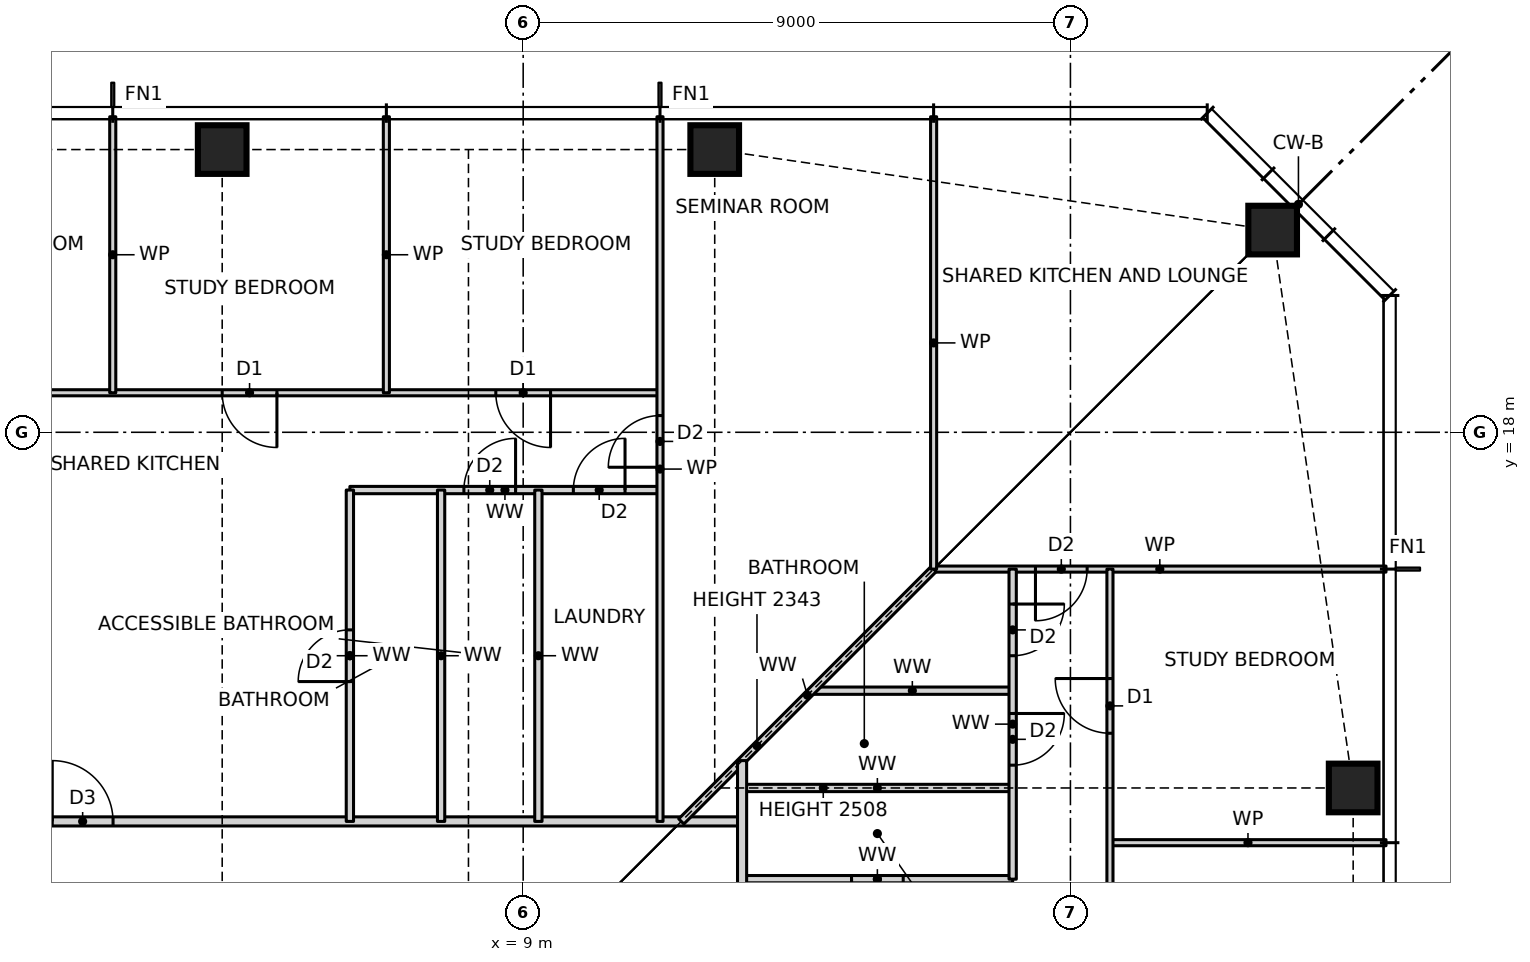
"""IFC4 building model, lengths in metres.
Left out: names, types, materials, properties, quantities, classifications, styles, units other than length and angle.
Written with IfcOpenShell. Run it as: python <this file> out.ifc"""

import sys

from ifc_helpers import new_model, si_unit, direction, frame, frame_2d, origin, origin_2d, place, context, subcontext, project, spatial, rectangle, hollow_rectangle, extrude, element, fill, save


model = new_model("IFC4")
c1 = context("Model", 3, precision=1e-05, world=origin(), true_north=direction((0.0, 1.0)))
c2 = subcontext(c1, "Body", "Model", "MODEL_VIEW")
j1 = project(units=[si_unit("LENGTHUNIT", "METRE"), si_unit("PLANEANGLEUNIT", "RADIAN")], contexts=[c1])
p1 = place(None, origin())
s1 = spatial("IfcSite", under=j1, at=p1, CompositionType="ELEMENT")
p2 = place(p1, origin())
s2 = spatial("IfcBuilding", under=s1, at=p2, CompositionType="ELEMENT")
p3 = place(p2, frame((0.0, 0.0, 32.5)))
s3 = spatial("IfcBuildingStorey", under=s2, at=p3, CompositionType="ELEMENT", Elevation=32.5)
for number, where, z_axis, x_axis in (
    (1, (22.65, 12.15, 0.0), (0.0, 0.0, 1.0), (1.0, 0.0, 0.0)),
    (2, (21.326, 21.326, 0.0), (0.0, 0.0, 1.0), (1.0, 0.0, 0.0)),
    (3, (12.15, 22.65, 0.0), (0.0, 0.0, 1.0), (1.0, 0.0, 0.0)),
    (4, (4.05, 22.65, 0.0), (0.0, 0.0, 1.0), (1.0, 0.0, 0.0)),
):
    element("IfcColumn", number, at=place(p3, frame(where, z_axis=z_axis, x_axis=x_axis)), inside=s3, PredefinedType="COLUMN", context=c2, shape_type="SweptSolid", body=[
        extrude(hollow_rectangle(XDim=0.8, YDim=0.8, WallThickness=0.09, at=origin_2d()), origin(), (0.0, 0.0, 1.0), 3.5),
    ])
p4 = place(p3, frame((12.6, 10.65, 0.0), z_axis=(0.0, 0.0, 1.0), x_axis=(1.0, 0.0, 0.0)))
e5 = element("IfcWall", 5, at=p4, inside=s3, PredefinedType="PARTITIONING", context=c2, shape_type="SweptSolid", body=[
    extrude(rectangle(XDim=4.45, YDim=0.12, at=frame_2d((2.225, 0.0))), origin(), (0.0, 0.0, 1.0), 3.27),
])
p5 = place(p4, frame((1.8, 0.0, 0.0)))
e6 = element("IfcOpeningElement", 6, at=p5, cuts=e5, PredefinedType="OPENING", context=c2, shape_type="SweptSolid", body=[
    extrude(rectangle(XDim=0.85, YDim=2.1, at=frame_2d((0.425, 1.05))), frame((0.0, 0.07, 0.0), z_axis=(0.0, -1.0, 0.0), x_axis=(1.0, 0.0, 0.0)), (0.0, 0.0, 1.0), 0.14),
])
p6 = place(p3, frame((18.65, 11.25, 0.0), z_axis=(0.0, 0.0, 1.0), x_axis=(1.0, 0.0, 0.0)))
e7 = element("IfcWall", 7, at=p6, inside=s3, PredefinedType="PARTITIONING", context=c2, shape_type="SweptSolid", body=[
    extrude(rectangle(XDim=4.54, YDim=0.1, at=frame_2d((2.27, 0.0))), origin(), (0.0, 0.0, 1.0), 3.27),
])
p7 = place(p3, frame((-11.6, 11.6, 0.0), z_axis=(0.0, 0.0, 1.0), x_axis=(1.0, 0.0, 0.0)))
e8 = element("IfcWall", 8, at=p7, inside=s3, PredefinedType="PARTITIONING", context=c2, shape_type="SweptSolid", body=[
    extrude(rectangle(XDim=24.2, YDim=0.15, at=frame_2d((12.1, 0.0))), origin(), (0.0, 0.0, 1.0), 3.27),
])
p8 = place(p7, frame((12.855, 0.0, 0.0)))
e9 = element("IfcOpeningElement", 9, at=p8, cuts=e8, PredefinedType="OPENING", context=c2, shape_type="SweptSolid", body=[
    extrude(rectangle(XDim=1.0, YDim=2.1, at=frame_2d((0.5, 1.05))), frame((0.0, 0.085, 0.0), z_axis=(0.0, -1.0, 0.0), x_axis=(1.0, 0.0, 0.0)), (0.0, 0.0, 1.0), 0.17),
])
p9 = place(p3, frame((12.6, 12.15, 0.0), z_axis=(0.0, 0.0, 1.0), x_axis=(1.0, 0.0, 0.0)))
e10 = element("IfcWall", 10, at=p9, inside=s3, PredefinedType="PARTITIONING", context=c2, shape_type="SweptSolid", body=[
    extrude(rectangle(XDim=4.45, YDim=0.12, at=frame_2d((2.225, 0.0))), origin(), (0.0, 0.0, 1.0), 2.508),
])
p10 = place(p3, frame((13.75, 13.75, 0.0), z_axis=(0.0, 0.0, 1.0), x_axis=(1.0, 0.0, 0.0)))
e11 = element("IfcWall", 11, at=p10, inside=s3, PredefinedType="PARTITIONING", context=c2, shape_type="SweptSolid", body=[
    extrude(rectangle(XDim=3.3, YDim=0.12, at=frame_2d((1.65, 0.0))), origin(), (0.0, 0.0, 1.0), 3.27),
])
p11 = place(p3, frame((15.75, 15.75, 0.0), z_axis=(0.0, 0.0, 1.0), x_axis=(1.0, 0.0, 0.0)))
e12 = element("IfcWall", 12, at=p11, inside=s3, PredefinedType="PARTITIONING", context=c2, shape_type="SweptSolid", body=[
    extrude(rectangle(XDim=7.44, YDim=0.1, at=frame_2d((3.72, 0.0))), origin(), (0.0, 0.0, 1.0), 3.27),
])
p12 = place(p11, frame((1.675, 0.0, 0.0)))
e13 = element("IfcOpeningElement", 13, at=p12, cuts=e12, PredefinedType="OPENING", context=c2, shape_type="SweptSolid", body=[
    extrude(rectangle(XDim=0.85, YDim=2.1, at=frame_2d((0.425, 1.05))), frame((0.0, 0.06, 0.0), z_axis=(0.0, -1.0, 0.0), x_axis=(1.0, 0.0, 0.0)), (0.0, 0.0, 1.0), 0.12),
])
p13 = place(p3, frame((6.15, 17.05, 0.0), z_axis=(0.0, 0.0, 1.0), x_axis=(1.0, 0.0, 0.0)))
e14 = element("IfcWall", 14, at=p13, inside=s3, PredefinedType="PARTITIONING", context=c2, shape_type="SweptSolid", body=[
    extrude(rectangle(XDim=5.1, YDim=0.12, at=frame_2d((2.55, 0.0))), origin(), (0.0, 0.0, 1.0), 3.27),
])
p14 = place(p13, frame((3.675, 0.0, 0.0)))
e15 = element("IfcOpeningElement", 15, at=p14, cuts=e14, PredefinedType="OPENING", context=c2, shape_type="SweptSolid", body=[
    extrude(rectangle(XDim=0.85, YDim=2.1, at=frame_2d((0.425, 1.05))), frame((0.0, 0.07, 0.0), z_axis=(0.0, -1.0, 0.0), x_axis=(1.0, 0.0, 0.0)), (0.0, 0.0, 1.0), 0.14),
])
p15 = place(p13, frame((1.875, 0.0, 0.0)))
e16 = element("IfcOpeningElement", 16, at=p15, cuts=e14, PredefinedType="OPENING", context=c2, shape_type="SweptSolid", body=[
    extrude(rectangle(XDim=0.85, YDim=2.1, at=frame_2d((0.425, 1.05))), frame((0.0, 0.07, 0.0), z_axis=(0.0, -1.0, 0.0), x_axis=(1.0, 0.0, 0.0)), (0.0, 0.0, 1.0), 0.14),
])
p16 = place(p3, frame((-15.75, 18.65, 0.0), z_axis=(0.0, 0.0, 1.0), x_axis=(1.0, 0.0, 0.0)))
e17 = element("IfcWall", 17, at=p16, inside=s3, PredefinedType="PARTITIONING", context=c2, shape_type="SweptSolid", body=[
    extrude(rectangle(XDim=27.0, YDim=0.1, at=frame_2d((13.5, 0.0))), origin(), (0.0, 0.0, 1.0), 3.27),
])
p17 = place(p16, frame((24.3, 0.0, 0.0)))
e18 = element("IfcOpeningElement", 18, at=p17, cuts=e17, PredefinedType="OPENING", context=c2, shape_type="SweptSolid", body=[
    extrude(rectangle(XDim=0.9, YDim=2.1, at=frame_2d((0.45, 1.05))), frame((0.0, 0.06, 0.0), z_axis=(0.0, -1.0, 0.0), x_axis=(1.0, 0.0, 0.0)), (0.0, 0.0, 1.0), 0.12),
])
p18 = place(p16, frame((19.8, 0.0, 0.0)))
e19 = element("IfcOpeningElement", 19, at=p18, cuts=e17, PredefinedType="OPENING", context=c2, shape_type="SweptSolid", body=[
    extrude(rectangle(XDim=0.9, YDim=2.1, at=frame_2d((0.45, 1.05))), frame((0.0, 0.06, 0.0), z_axis=(0.0, -1.0, 0.0), x_axis=(1.0, 0.0, 0.0)), (0.0, 0.0, 1.0), 0.12),
])
p19 = place(p16, frame((15.3, 0.0, 0.0)))
e20 = element("IfcOpeningElement", 20, at=p19, cuts=e17, PredefinedType="OPENING", context=c2, shape_type="SweptSolid", body=[
    extrude(rectangle(XDim=0.9, YDim=2.1, at=frame_2d((0.45, 1.05))), frame((0.0, 0.06, 0.0), z_axis=(0.0, -1.0, 0.0), x_axis=(1.0, 0.0, 0.0)), (0.0, 0.0, 1.0), 0.12),
])
p20 = place(p16, frame((10.8, 0.0, 0.0)))
e21 = element("IfcOpeningElement", 21, at=p20, cuts=e17, PredefinedType="OPENING", context=c2, shape_type="SweptSolid", body=[
    extrude(rectangle(XDim=0.9, YDim=2.1, at=frame_2d((0.45, 1.05))), frame((0.0, 0.06, 0.0), z_axis=(0.0, -1.0, 0.0), x_axis=(1.0, 0.0, 0.0)), (0.0, 0.0, 1.0), 0.12),
])
p21 = place(p16, frame((6.3, 0.0, 0.0)))
e22 = element("IfcOpeningElement", 22, at=p21, cuts=e17, PredefinedType="OPENING", context=c2, shape_type="SweptSolid", body=[
    extrude(rectangle(XDim=0.9, YDim=2.1, at=frame_2d((0.45, 1.05))), frame((0.0, 0.06, 0.0), z_axis=(0.0, -1.0, 0.0), x_axis=(1.0, 0.0, 0.0)), (0.0, 0.0, 1.0), 0.12),
])
p22 = place(p16, frame((1.8, 0.0, 0.0)))
e23 = element("IfcOpeningElement", 23, at=p22, cuts=e17, PredefinedType="OPENING", context=c2, shape_type="SweptSolid", body=[
    extrude(rectangle(XDim=0.9, YDim=2.1, at=frame_2d((0.45, 1.05))), frame((0.0, 0.06, 0.0), z_axis=(0.0, -1.0, 0.0), x_axis=(1.0, 0.0, 0.0)), (0.0, 0.0, 1.0), 0.12),
])
p23 = place(p3, frame((11.6, 11.6, 0.0), z_axis=(0.0, 0.0, 1.0), x_axis=(0.707106781187, 0.707106781187, 0.0)))
e24 = element("IfcWall", 24, at=p23, inside=s3, PredefinedType="PARTITIONING", context=c2, shape_type="SweptSolid", body=[
    extrude(rectangle(XDim=5.869, YDim=0.12, at=frame_2d((2.935, 0.0))), origin(), (0.0, 0.0, 1.0), 2.343),
])
p24 = place(p3, frame((18.65, -15.75, 0.0), z_axis=(0.0, 0.0, 1.0), x_axis=(0.0, 1.0, 0.0)))
e25 = element("IfcWall", 25, at=p24, inside=s3, PredefinedType="PARTITIONING", context=c2, shape_type="SweptSolid", body=[
    extrude(rectangle(XDim=31.5, YDim=0.1, at=frame_2d((15.75, 0.0))), origin(), (0.0, 0.0, 1.0), 3.27),
])
p25 = place(p24, frame((1.8, 0.0, 0.0)))
e26 = element("IfcOpeningElement", 26, at=p25, cuts=e25, PredefinedType="OPENING", context=c2, shape_type="SweptSolid", body=[
    extrude(rectangle(XDim=0.9, YDim=2.1, at=frame_2d((0.45, 1.05))), frame((0.0, 0.06, 0.0), z_axis=(0.0, -1.0, 0.0), x_axis=(1.0, 0.0, 0.0)), (0.0, 0.0, 1.0), 0.12),
])
p26 = place(p24, frame((6.3, 0.0, 0.0)))
e27 = element("IfcOpeningElement", 27, at=p26, cuts=e25, PredefinedType="OPENING", context=c2, shape_type="SweptSolid", body=[
    extrude(rectangle(XDim=0.9, YDim=2.1, at=frame_2d((0.45, 1.05))), frame((0.0, 0.06, 0.0), z_axis=(0.0, -1.0, 0.0), x_axis=(1.0, 0.0, 0.0)), (0.0, 0.0, 1.0), 0.12),
])
p27 = place(p24, frame((10.8, 0.0, 0.0)))
e28 = element("IfcOpeningElement", 28, at=p27, cuts=e25, PredefinedType="OPENING", context=c2, shape_type="SweptSolid", body=[
    extrude(rectangle(XDim=0.9, YDim=2.1, at=frame_2d((0.45, 1.05))), frame((0.0, 0.06, 0.0), z_axis=(0.0, -1.0, 0.0), x_axis=(1.0, 0.0, 0.0)), (0.0, 0.0, 1.0), 0.12),
])
p28 = place(p24, frame((15.3, 0.0, 0.0)))
e29 = element("IfcOpeningElement", 29, at=p28, cuts=e25, PredefinedType="OPENING", context=c2, shape_type="SweptSolid", body=[
    extrude(rectangle(XDim=0.9, YDim=2.1, at=frame_2d((0.45, 1.05))), frame((0.0, 0.06, 0.0), z_axis=(0.0, -1.0, 0.0), x_axis=(1.0, 0.0, 0.0)), (0.0, 0.0, 1.0), 0.12),
])
p29 = place(p24, frame((19.8, 0.0, 0.0)))
e30 = element("IfcOpeningElement", 30, at=p29, cuts=e25, PredefinedType="OPENING", context=c2, shape_type="SweptSolid", body=[
    extrude(rectangle(XDim=0.9, YDim=2.1, at=frame_2d((0.45, 1.05))), frame((0.0, 0.06, 0.0), z_axis=(0.0, -1.0, 0.0), x_axis=(1.0, 0.0, 0.0)), (0.0, 0.0, 1.0), 0.12),
])
p30 = place(p24, frame((24.3, 0.0, 0.0)))
e31 = element("IfcOpeningElement", 31, at=p30, cuts=e25, PredefinedType="OPENING", context=c2, shape_type="SweptSolid", body=[
    extrude(rectangle(XDim=0.9, YDim=2.1, at=frame_2d((0.45, 1.05))), frame((0.0, 0.06, 0.0), z_axis=(0.0, -1.0, 0.0), x_axis=(1.0, 0.0, 0.0)), (0.0, 0.0, 1.0), 0.12),
])
p31 = place(p24, frame((28.8, 0.0, 0.0)))
e32 = element("IfcOpeningElement", 32, at=p31, cuts=e25, PredefinedType="OPENING", context=c2, shape_type="SweptSolid", body=[
    extrude(rectangle(XDim=0.9, YDim=2.1, at=frame_2d((0.45, 1.05))), frame((0.0, 0.06, 0.0), z_axis=(0.0, -1.0, 0.0), x_axis=(1.0, 0.0, 0.0)), (0.0, 0.0, 1.0), 0.12),
])
p32 = place(p3, frame((17.05, 10.65, 0.0), z_axis=(0.0, 0.0, 1.0), x_axis=(0.0, 1.0, 0.0)))
e33 = element("IfcWall", 33, at=p32, inside=s3, PredefinedType="PARTITIONING", context=c2, shape_type="SweptSolid", body=[
    extrude(rectangle(XDim=5.1, YDim=0.12, at=frame_2d((2.55, 0.0))), origin(), (0.0, 0.0, 1.0), 3.27),
])
p33 = place(p32, frame((1.875, 0.0, 0.0)))
e34 = element("IfcOpeningElement", 34, at=p33, cuts=e33, PredefinedType="OPENING", context=c2, shape_type="SweptSolid", body=[
    extrude(rectangle(XDim=0.85, YDim=2.1, at=frame_2d((0.425, 1.05))), frame((0.0, 0.07, 0.0), z_axis=(0.0, -1.0, 0.0), x_axis=(1.0, 0.0, 0.0)), (0.0, 0.0, 1.0), 0.14),
])
p34 = place(p32, frame((3.675, 0.0, 0.0)))
e35 = element("IfcOpeningElement", 35, at=p34, cuts=e33, PredefinedType="OPENING", context=c2, shape_type="SweptSolid", body=[
    extrude(rectangle(XDim=0.85, YDim=2.1, at=frame_2d((0.425, 1.05))), frame((0.0, 0.07, 0.0), z_axis=(0.0, -1.0, 0.0), x_axis=(1.0, 0.0, 0.0)), (0.0, 0.0, 1.0), 0.14),
])
p35 = place(p3, frame((15.75, 15.75, 0.0), z_axis=(0.0, 0.0, 1.0), x_axis=(0.0, 1.0, 0.0)))
e36 = element("IfcWall", 36, at=p35, inside=s3, PredefinedType="PARTITIONING", context=c2, shape_type="SweptSolid", body=[
    extrude(rectangle(XDim=7.44, YDim=0.1, at=frame_2d((3.72, 0.0))), origin(), (0.0, 0.0, 1.0), 3.27),
])
p36 = place(p3, frame((12.6, -12.6, 0.0), z_axis=(0.0, 0.0, 1.0), x_axis=(0.0, 1.0, 0.0)))
e37 = element("IfcWall", 37, at=p36, inside=s3, PredefinedType="PARTITIONING", context=c2, shape_type="SweptSolid", body=[
    extrude(rectangle(XDim=25.2, YDim=0.15, at=frame_2d((12.6, 0.0))), origin(), (0.0, 0.0, 1.0), 3.27),
])
p37 = place(p36, frame((21.55, 0.0, 0.0)))
e38 = element("IfcOpeningElement", 38, at=p37, cuts=e37, PredefinedType="OPENING", context=c2, shape_type="SweptSolid", body=[
    extrude(rectangle(XDim=1.0, YDim=2.1, at=frame_2d((0.5, 1.05))), frame((0.0, 0.085, 0.0), z_axis=(0.0, -1.0, 0.0), x_axis=(1.0, 0.0, 0.0)), (0.0, 0.0, 1.0), 0.17),
])
p38 = place(p3, frame((11.25, 11.6, 0.0), z_axis=(0.0, 0.0, 1.0), x_axis=(0.0, 1.0, 0.0)))
e39 = element("IfcWall", 39, at=p38, inside=s3, PredefinedType="PARTITIONING", context=c2, shape_type="SweptSolid", body=[
    extrude(rectangle(XDim=11.59, YDim=0.1, at=frame_2d((5.795, 0.0))), origin(), (0.0, 0.0, 1.0), 3.27),
])
p39 = place(p38, frame((5.825, 0.0, 0.0)))
e40 = element("IfcOpeningElement", 40, at=p39, cuts=e39, PredefinedType="OPENING", context=c2, shape_type="SweptSolid", body=[
    extrude(rectangle(XDim=0.85, YDim=2.1, at=frame_2d((0.425, 1.05))), frame((0.0, 0.06, 0.0), z_axis=(0.0, -1.0, 0.0), x_axis=(1.0, 0.0, 0.0)), (0.0, 0.0, 1.0), 0.12),
])
for number, where, z_axis, x_axis in (
    (41, (9.25, 11.6, 0.0), (0.0, 0.0, 1.0), (0.0, 1.0, 0.0)),
    (42, (7.65, 11.6, 0.0), (0.0, 0.0, 1.0), (0.0, 1.0, 0.0)),
):
    element("IfcWall", number, at=place(p3, frame(where, z_axis=z_axis, x_axis=x_axis)), inside=s3, PredefinedType="PARTITIONING", context=c2, shape_type="SweptSolid", body=[
        extrude(rectangle(XDim=5.45, YDim=0.12, at=frame_2d((2.725, 0.0))), origin(), (0.0, 0.0, 1.0), 3.27),
    ])
p40 = place(p3, frame((6.75, 18.65, 0.0), z_axis=(0.0, 0.0, 1.0), x_axis=(0.0, 1.0, 0.0)))
e43 = element("IfcWall", 43, at=p40, inside=s3, PredefinedType="PARTITIONING", context=c2, shape_type="SweptSolid", body=[
    extrude(rectangle(XDim=4.54, YDim=0.1, at=frame_2d((2.27, 0.0))), origin(), (0.0, 0.0, 1.0), 3.27),
])
p41 = place(p3, frame((6.15, 11.6, 0.0), z_axis=(0.0, 0.0, 1.0), x_axis=(0.0, 1.0, 0.0)))
e44 = element("IfcWall", 44, at=p41, inside=s3, PredefinedType="PARTITIONING", context=c2, shape_type="SweptSolid", body=[
    extrude(rectangle(XDim=5.45, YDim=0.12, at=frame_2d((2.725, 0.0))), origin(), (0.0, 0.0, 1.0), 3.27),
])
p42 = place(p41, frame((2.3, 0.0, 0.0)))
e45 = element("IfcOpeningElement", 45, at=p42, cuts=e44, PredefinedType="OPENING", context=c2, shape_type="SweptSolid", body=[
    extrude(rectangle(XDim=0.85, YDim=2.1, at=frame_2d((0.425, 1.05))), frame((0.0, 0.07, 0.0), z_axis=(0.0, -1.0, 0.0), x_axis=(1.0, 0.0, 0.0)), (0.0, 0.0, 1.0), 0.14),
])
p43 = place(p3, frame((2.25, 18.65, 0.0), z_axis=(0.0, 0.0, 1.0), x_axis=(0.0, 1.0, 0.0)))
e46 = element("IfcWall", 46, at=p43, inside=s3, PredefinedType="PARTITIONING", context=c2, shape_type="SweptSolid", body=[
    extrude(rectangle(XDim=4.54, YDim=0.1, at=frame_2d((2.27, 0.0))), origin(), (0.0, 0.0, 1.0), 3.27),
])
p44 = place(p31, origin())
e47 = element("IfcDoor", 47, at=p44, inside=s3, OperationType="SINGLE_SWING_RIGHT", PredefinedType="DOOR", context=c2, shape_type="SweptSolid", body=[
    extrude(rectangle(XDim=0.9, YDim=2.1, at=frame_2d((0.45, 1.05))), frame((0.0, 0.025, 0.0), z_axis=(0.0, -1.0, 0.0), x_axis=(1.0, 0.0, 0.0)), (0.0, 0.0, 1.0), 0.05),
])
fill(e32, e47)
p45 = place(p5, frame((0.85, 0.0, 0.0), z_axis=(0.0, 0.0, 1.0), x_axis=(-1.0, 0.0, 0.0)))
e48 = element("IfcDoor", 48, at=p45, inside=s3, OperationType="SINGLE_SWING_RIGHT", PredefinedType="DOOR", context=c2, shape_type="SweptSolid", body=[
    extrude(rectangle(XDim=0.85, YDim=2.1, at=frame_2d((0.425, 1.05))), frame((0.0, 0.025, 0.0), z_axis=(0.0, -1.0, 0.0), x_axis=(1.0, 0.0, 0.0)), (0.0, 0.0, 1.0), 0.05),
])
fill(e6, e48)
p46 = place(p33, frame((0.85, 0.0, 0.0), z_axis=(0.0, 0.0, 1.0), x_axis=(-1.0, 0.0, 0.0)))
e49 = element("IfcDoor", 49, at=p46, inside=s3, OperationType="SINGLE_SWING_LEFT", PredefinedType="DOOR", context=c2, shape_type="SweptSolid", body=[
    extrude(rectangle(XDim=0.85, YDim=2.1, at=frame_2d((0.425, 1.05))), frame((0.0, 0.025, 0.0), z_axis=(0.0, -1.0, 0.0), x_axis=(1.0, 0.0, 0.0)), (0.0, 0.0, 1.0), 0.05),
])
fill(e34, e49)
p47 = place(p34, frame((0.85, 0.0, 0.0), z_axis=(0.0, 0.0, 1.0), x_axis=(-1.0, 0.0, 0.0)))
e50 = element("IfcDoor", 50, at=p47, inside=s3, OperationType="SINGLE_SWING_LEFT", PredefinedType="DOOR", context=c2, shape_type="SweptSolid", body=[
    extrude(rectangle(XDim=0.85, YDim=2.1, at=frame_2d((0.425, 1.05))), frame((0.0, 0.025, 0.0), z_axis=(0.0, -1.0, 0.0), x_axis=(1.0, 0.0, 0.0)), (0.0, 0.0, 1.0), 0.05),
])
fill(e35, e50)
p48 = place(p39, origin())
e51 = element("IfcDoor", 51, at=p48, inside=s3, OperationType="SINGLE_SWING_LEFT", PredefinedType="DOOR", context=c2, shape_type="SweptSolid", body=[
    extrude(rectangle(XDim=0.85, YDim=2.1, at=frame_2d((0.425, 1.05))), frame((0.0, 0.025, 0.0), z_axis=(0.0, -1.0, 0.0), x_axis=(1.0, 0.0, 0.0)), (0.0, 0.0, 1.0), 0.05),
])
fill(e40, e51)
p49 = place(p17, frame((0.9, 0.0, 0.0), z_axis=(0.0, 0.0, 1.0), x_axis=(-1.0, 0.0, 0.0)))
e52 = element("IfcDoor", 52, at=p49, inside=s3, OperationType="SINGLE_SWING_LEFT", PredefinedType="DOOR", context=c2, shape_type="SweptSolid", body=[
    extrude(rectangle(XDim=0.9, YDim=2.1, at=frame_2d((0.45, 1.05))), frame((0.0, 0.025, 0.0), z_axis=(0.0, -1.0, 0.0), x_axis=(1.0, 0.0, 0.0)), (0.0, 0.0, 1.0), 0.05),
])
fill(e18, e52)
p50 = place(p18, frame((0.9, 0.0, 0.0), z_axis=(0.0, 0.0, 1.0), x_axis=(-1.0, 0.0, 0.0)))
e53 = element("IfcDoor", 53, at=p50, inside=s3, OperationType="SINGLE_SWING_LEFT", PredefinedType="DOOR", context=c2, shape_type="SweptSolid", body=[
    extrude(rectangle(XDim=0.9, YDim=2.1, at=frame_2d((0.45, 1.05))), frame((0.0, 0.025, 0.0), z_axis=(0.0, -1.0, 0.0), x_axis=(1.0, 0.0, 0.0)), (0.0, 0.0, 1.0), 0.05),
])
fill(e19, e53)
p51 = place(p8, origin())
e54 = element("IfcDoor", 54, at=p51, inside=s3, OperationType="SINGLE_SWING_LEFT", PredefinedType="DOOR", context=c2, shape_type="SweptSolid", body=[
    extrude(rectangle(XDim=1.0, YDim=2.1, at=frame_2d((0.5, 1.05))), frame((0.0, 0.025, 0.0), z_axis=(0.0, -1.0, 0.0), x_axis=(1.0, 0.0, 0.0)), (0.0, 0.0, 1.0), 0.05),
])
fill(e9, e54)
p52 = place(p14, origin())
e55 = element("IfcDoor", 55, at=p52, inside=s3, OperationType="SINGLE_SWING_RIGHT", PredefinedType="DOOR", context=c2, shape_type="SweptSolid", body=[
    extrude(rectangle(XDim=0.85, YDim=2.1, at=frame_2d((0.425, 1.05))), frame((0.0, 0.025, 0.0), z_axis=(0.0, -1.0, 0.0), x_axis=(1.0, 0.0, 0.0)), (0.0, 0.0, 1.0), 0.05),
])
fill(e15, e55)
p53 = place(p15, origin())
e56 = element("IfcDoor", 56, at=p53, inside=s3, OperationType="SINGLE_SWING_RIGHT", PredefinedType="DOOR", context=c2, shape_type="SweptSolid", body=[
    extrude(rectangle(XDim=0.85, YDim=2.1, at=frame_2d((0.425, 1.05))), frame((0.0, 0.025, 0.0), z_axis=(0.0, -1.0, 0.0), x_axis=(1.0, 0.0, 0.0)), (0.0, 0.0, 1.0), 0.05),
])
fill(e16, e56)
p54 = place(p42, origin())
e57 = element("IfcDoor", 57, at=p54, inside=s3, OperationType="SINGLE_SWING_LEFT", PredefinedType="DOOR", context=c2, shape_type="SweptSolid", body=[
    extrude(rectangle(XDim=0.85, YDim=2.1, at=frame_2d((0.425, 1.05))), frame((0.0, 0.025, 0.0), z_axis=(0.0, -1.0, 0.0), x_axis=(1.0, 0.0, 0.0)), (0.0, 0.0, 1.0), 0.05),
])
fill(e45, e57)
p55 = place(p12, frame((0.85, 0.0, 0.0), z_axis=(0.0, 0.0, 1.0), x_axis=(-1.0, 0.0, 0.0)))
e58 = element("IfcDoor", 58, at=p55, inside=s3, OperationType="SINGLE_SWING_RIGHT", PredefinedType="DOOR", context=c2, shape_type="SweptSolid", body=[
    extrude(rectangle(XDim=0.85, YDim=2.1, at=frame_2d((0.425, 1.05))), frame((0.0, 0.025, 0.0), z_axis=(0.0, -1.0, 0.0), x_axis=(1.0, 0.0, 0.0)), (0.0, 0.0, 1.0), 0.05),
])
fill(e13, e58)
save(model, sys.argv[1])
